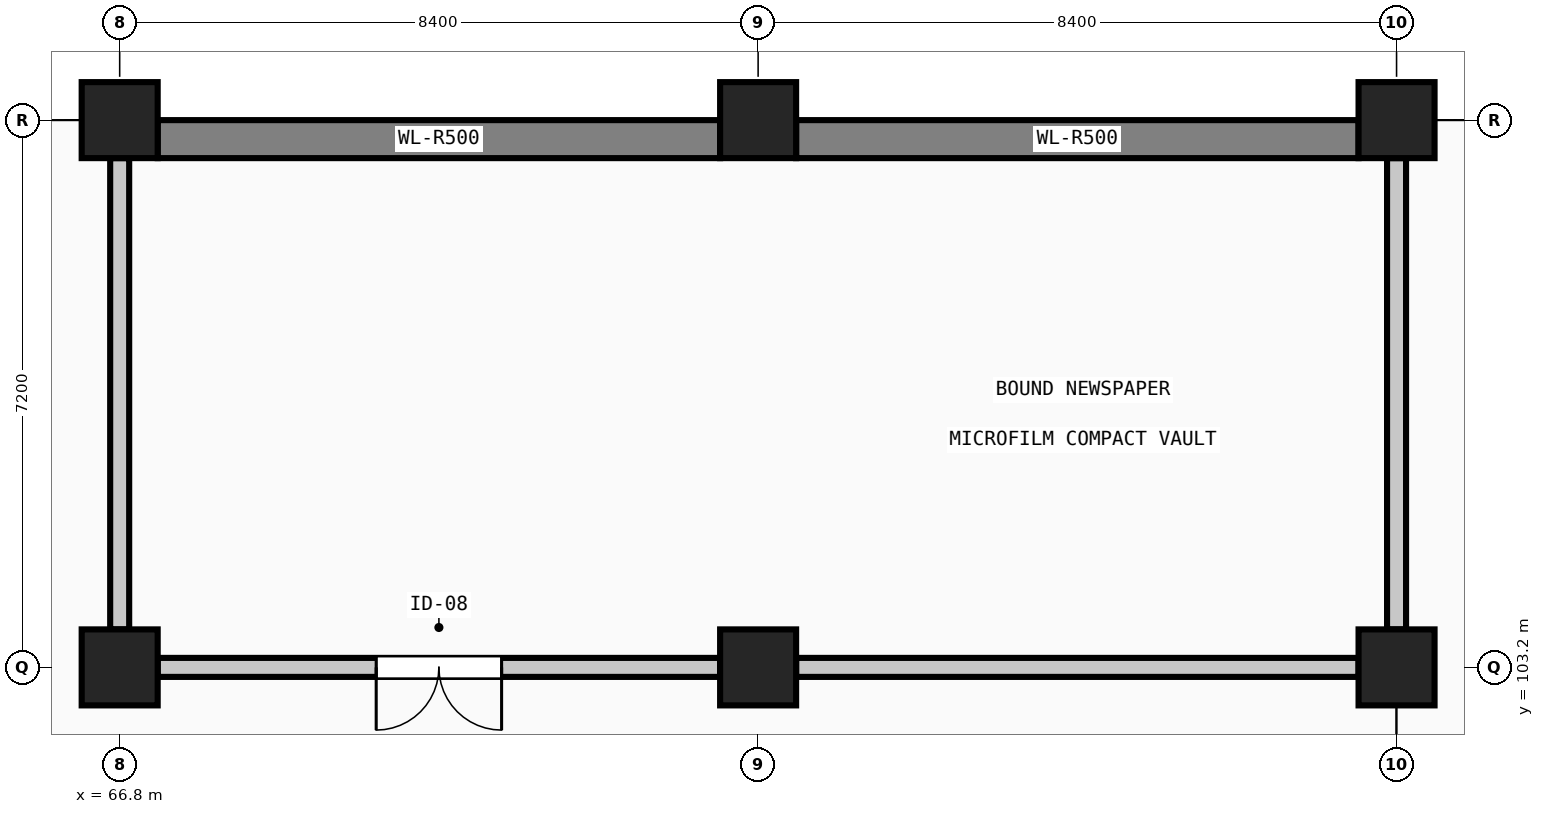
"""IFC4 building model, lengths in metres.
Left out: names, types, materials, properties, quantities, classifications, styles, units other than length and angle.
Written with IfcOpenShell. Run it as: python <this file> out.ifc"""

import sys

from ifc_helpers import new_model, si_unit, direction, frame, frame_2d, origin, origin_2d, place, context, subcontext, project, spatial, rectangle, extrude, element, fill, save


model = new_model("IFC4")
c1 = context("Model", 3, precision=1e-05, world=origin(), true_north=direction((0.0, 1.0)))
c2 = subcontext(c1, "Body", "Model", "MODEL_VIEW")
j1 = project(units=[si_unit("LENGTHUNIT", "METRE"), si_unit("PLANEANGLEUNIT", "RADIAN")], contexts=[c1])
p1 = place(None, origin())
s1 = spatial("IfcSite", under=j1, at=p1, CompositionType="ELEMENT")
p2 = place(p1, origin())
s2 = spatial("IfcBuilding", under=s1, at=p2, CompositionType="ELEMENT")
p3 = place(p2, frame((0.0, 0.0, -4.8)))
s3 = spatial("IfcBuildingStorey", under=s2, at=p3, CompositionType="ELEMENT", Elevation=-4.8)
for number, where, z_axis, x_axis in (
    (1, (66.8, 103.2, 0.0), (0.0, 0.0, 1.0), (1.0, 0.0, 0.0)),
    (2, (66.8, 110.4, 0.0), (0.0, 0.0, 1.0), (1.0, 0.0, 0.0)),
    (3, (75.2, 103.2, 0.0), (0.0, 0.0, 1.0), (1.0, 0.0, 0.0)),
    (4, (75.2, 110.4, 0.0), (0.0, 0.0, 1.0), (1.0, 0.0, 0.0)),
    (5, (83.6, 103.2, 0.0), (0.0, 0.0, 1.0), (1.0, 0.0, 0.0)),
    (6, (83.6, 110.4, 0.0), (0.0, 0.0, 1.0), (1.0, 0.0, 0.0)),
):
    element("IfcColumn", number, at=place(p3, frame(where, z_axis=z_axis, x_axis=x_axis)), inside=s3, PredefinedType="COLUMN", context=c2, shape_type="SweptSolid", body=[
        extrude(rectangle(XDim=1.0, YDim=1.0, at=origin_2d()), origin(), (0.0, 0.0, 1.0), 4.8),
    ])
p4 = place(p3, frame((67.3, 110.15, 0.0), z_axis=(0.0, 0.0, 1.0), x_axis=(1.0, 0.0, 0.0)))
e7 = element("IfcWall", 7, at=p4, inside=s3, PredefinedType="USERDEFINED", context=c2, shape_type="SweptSolid", body=[
    extrude(rectangle(XDim=7.4, YDim=0.5, at=frame_2d((3.7, 0.0))), origin(), (0.0, 0.0, 1.0), 4.5),
])
p5 = place(p3, frame((75.7, 110.15, 0.0), z_axis=(0.0, 0.0, 1.0), x_axis=(1.0, 0.0, 0.0)))
e8 = element("IfcWall", 8, at=p5, inside=s3, PredefinedType="USERDEFINED", context=c2, shape_type="SweptSolid", body=[
    extrude(rectangle(XDim=7.4, YDim=0.5, at=frame_2d((3.7, 0.0))), origin(), (0.0, 0.0, 1.0), 4.5),
])
p6 = place(p3, frame((83.1, 103.2, 0.0), z_axis=(0.0, 0.0, 1.0), x_axis=(-1.0, 0.0, 0.0)))
e9 = element("IfcWall", 9, at=p6, inside=s3, PredefinedType="SOLIDWALL", context=c2, shape_type="SweptSolid", body=[
    extrude(rectangle(XDim=7.4, YDim=0.25, at=frame_2d((3.7, 0.0))), origin(), (0.0, 0.0, 1.0), 3.75),
])
p7 = place(p3, frame((74.7, 103.2, 0.0), z_axis=(0.0, 0.0, 1.0), x_axis=(-1.0, 0.0, 0.0)))
e10 = element("IfcWall", 10, at=p7, inside=s3, PredefinedType="SOLIDWALL", context=c2, shape_type="SweptSolid", body=[
    extrude(rectangle(XDim=7.4, YDim=0.25, at=frame_2d((3.7, 0.0))), origin(), (0.0, 0.0, 1.0), 3.75),
])
p8 = place(p7, frame((2.875, 0.0, 0.0)))
e11 = element("IfcOpeningElement", 11, at=p8, cuts=e10, PredefinedType="OPENING", context=c2, shape_type="SweptSolid", body=[
    extrude(rectangle(XDim=1.65, YDim=2.25, at=frame_2d((0.825, 1.125))), frame((0.0, 0.135, 0.0), z_axis=(0.0, -1.0, 0.0), x_axis=(1.0, 0.0, 0.0)), (0.0, 0.0, 1.0), 0.27),
])
for number, where, z_axis, x_axis in (
    (12, (66.8, 103.7, 0.0), (0.0, 0.0, 1.0), (0.0, 1.0, 0.0)),
    (13, (83.6, 109.9, 0.0), (0.0, 0.0, 1.0), (0.0, -1.0, 0.0)),
):
    element("IfcWall", number, at=place(p3, frame(where, z_axis=z_axis, x_axis=x_axis)), inside=s3, PredefinedType="SOLIDWALL", context=c2, shape_type="SweptSolid", body=[
        extrude(rectangle(XDim=6.2, YDim=0.25, at=frame_2d((3.1, 0.0))), origin(), (0.0, 0.0, 1.0), 3.85),
    ])
p9 = place(p8, origin())
e14 = element("IfcDoor", 14, at=p9, inside=s3, OperationType="DOUBLE_DOOR_SINGLE_SWING", PredefinedType="DOOR", context=c2, shape_type="SweptSolid", body=[
    extrude(rectangle(XDim=1.65, YDim=2.25, at=frame_2d((0.825, 1.125))), frame((0.0, 0.025, 0.0), z_axis=(0.0, -1.0, 0.0), x_axis=(1.0, 0.0, 0.0)), (0.0, 0.0, 1.0), 0.05),
])
fill(e11, e14)
save(model, sys.argv[1])
